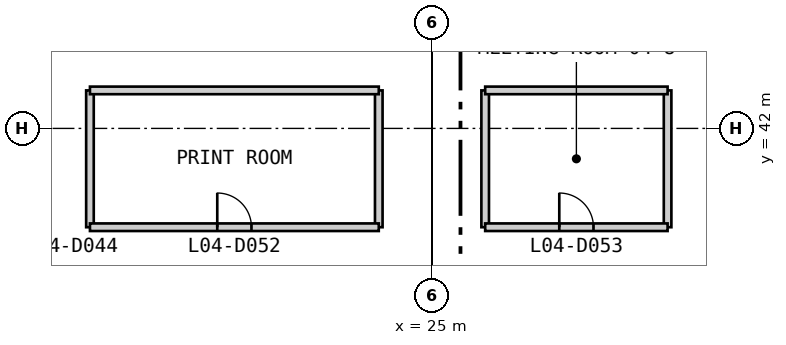
"""IFC4 building model, lengths in metres.
Left out: names, types, materials, properties, quantities, classifications, styles, units other than length and angle.
Written with IfcOpenShell. Run it as: python <this file> out.ifc"""

import sys

from ifc_helpers import new_model, si_unit, direction, frame, frame_2d, origin, place, context, subcontext, project, spatial, rectangle, extrude, element, fill, save


model = new_model("IFC4")
c1 = context("Model", 3, precision=1e-05, world=origin(), true_north=direction((0.0, 1.0)))
c2 = subcontext(c1, "Body", "Model", "MODEL_VIEW")
j1 = project(units=[si_unit("LENGTHUNIT", "METRE"), si_unit("PLANEANGLEUNIT", "RADIAN")], contexts=[c1])
p1 = place(None, origin())
s1 = spatial("IfcSite", under=j1, at=p1, CompositionType="ELEMENT")
p2 = place(p1, origin())
s2 = spatial("IfcBuilding", under=s1, at=p2, CompositionType="ELEMENT")
p3 = place(p2, frame((0.0, 0.0, 21.4)))
s3 = spatial("IfcBuildingStorey", under=s2, at=p3, CompositionType="ELEMENT", Elevation=21.4)
p4 = place(p3, frame((16.0, 39.4, 0.0), z_axis=(0.0, 0.0, 1.0), x_axis=(0.0, 1.0, 0.0)))
e1 = element("IfcWall", 1, at=p4, inside=s3, PredefinedType="PARTITIONING", context=c2, shape_type="SweptSolid", body=[
    extrude(rectangle(XDim=3.6, YDim=0.2, at=frame_2d((1.8, 0.0))), origin(), (0.0, 0.0, 1.0), 3.843),
])
for number, where, z_axis, x_axis in (
    (2, (23.6, 39.4, 0.0), (0.0, 0.0, 1.0), (0.0, 1.0, 0.0)),
    (3, (26.4, 39.4, 0.0), (0.0, 0.0, 1.0), (0.0, 1.0, 0.0)),
    (4, (31.2, 39.4, 0.0), (0.0, 0.0, 1.0), (0.0, 1.0, 0.0)),
):
    element("IfcWall", number, at=place(p3, frame(where, z_axis=z_axis, x_axis=x_axis)), inside=s3, PredefinedType="PARTITIONING", context=c2, shape_type="SweptSolid", body=[
        extrude(rectangle(XDim=3.6, YDim=0.2, at=frame_2d((1.8, 0.0))), origin(), (0.0, 0.0, 1.0), 4.5),
    ])
p5 = place(p3, frame((16.0, 39.4, 0.0), z_axis=(0.0, 0.0, 1.0), x_axis=(1.0, 0.0, 0.0)))
e5 = element("IfcWall", 5, at=p5, inside=s3, PredefinedType="PARTITIONING", context=c2, shape_type="SweptSolid", body=[
    extrude(rectangle(XDim=7.6, YDim=0.2, at=frame_2d((3.8, 0.0))), origin(), (0.0, 0.0, 1.0), 4.5),
])
p6 = place(p5, frame((3.35, 0.0, 0.0)))
e6 = element("IfcOpeningElement", 6, at=p6, cuts=e5, PredefinedType="OPENING", context=c2, shape_type="SweptSolid", body=[
    extrude(rectangle(XDim=0.9, YDim=2.2, at=frame_2d((0.45, 1.1))), frame((0.0, 0.11, 0.0), z_axis=(0.0, -1.0, 0.0), x_axis=(1.0, 0.0, 0.0)), (0.0, 0.0, 1.0), 0.22),
])
p7 = place(p3, frame((26.4, 39.4, 0.0), z_axis=(0.0, 0.0, 1.0), x_axis=(1.0, 0.0, 0.0)))
e7 = element("IfcWall", 7, at=p7, inside=s3, PredefinedType="PARTITIONING", context=c2, shape_type="SweptSolid", body=[
    extrude(rectangle(XDim=4.8, YDim=0.2, at=frame_2d((2.4, 0.0))), origin(), (0.0, 0.0, 1.0), 4.5),
])
p8 = place(p7, frame((1.95, 0.0, 0.0)))
e8 = element("IfcOpeningElement", 8, at=p8, cuts=e7, PredefinedType="OPENING", context=c2, shape_type="SweptSolid", body=[
    extrude(rectangle(XDim=0.9, YDim=2.2, at=frame_2d((0.45, 1.1))), frame((0.0, 0.11, 0.0), z_axis=(0.0, -1.0, 0.0), x_axis=(1.0, 0.0, 0.0)), (0.0, 0.0, 1.0), 0.22),
])
p9 = place(p3, frame((16.0, 43.0, 0.0), z_axis=(0.0, 0.0, 1.0), x_axis=(1.0, 0.0, 0.0)))
e9 = element("IfcWall", 9, at=p9, inside=s3, PredefinedType="PARTITIONING", context=c2, shape_type="SweptSolid", body=[
    extrude(rectangle(XDim=7.6, YDim=0.2, at=frame_2d((3.8, 0.0))), origin(), (0.0, 0.0, 1.0), 4.5),
])
p10 = place(p3, frame((26.4, 43.0, 0.0), z_axis=(0.0, 0.0, 1.0), x_axis=(1.0, 0.0, 0.0)))
e10 = element("IfcWall", 10, at=p10, inside=s3, PredefinedType="PARTITIONING", context=c2, shape_type="SweptSolid", body=[
    extrude(rectangle(XDim=4.8, YDim=0.2, at=frame_2d((2.4, 0.0))), origin(), (0.0, 0.0, 1.0), 4.5),
])
p11 = place(p6, origin())
e11 = element("IfcDoor", 11, at=p11, inside=s3, OperationType="SINGLE_SWING_LEFT", PredefinedType="DOOR", context=c2, shape_type="SweptSolid", body=[
    extrude(rectangle(XDim=0.9, YDim=2.2, at=frame_2d((0.45, 1.1))), frame((0.0, 0.025, 0.0), z_axis=(0.0, -1.0, 0.0), x_axis=(1.0, 0.0, 0.0)), (0.0, 0.0, 1.0), 0.05),
])
fill(e6, e11)
p12 = place(p8, origin())
e12 = element("IfcDoor", 12, at=p12, inside=s3, OperationType="SINGLE_SWING_LEFT", PredefinedType="DOOR", context=c2, shape_type="SweptSolid", body=[
    extrude(rectangle(XDim=0.9, YDim=2.2, at=frame_2d((0.45, 1.1))), frame((0.0, 0.025, 0.0), z_axis=(0.0, -1.0, 0.0), x_axis=(1.0, 0.0, 0.0)), (0.0, 0.0, 1.0), 0.05),
])
fill(e8, e12)
save(model, sys.argv[1])
